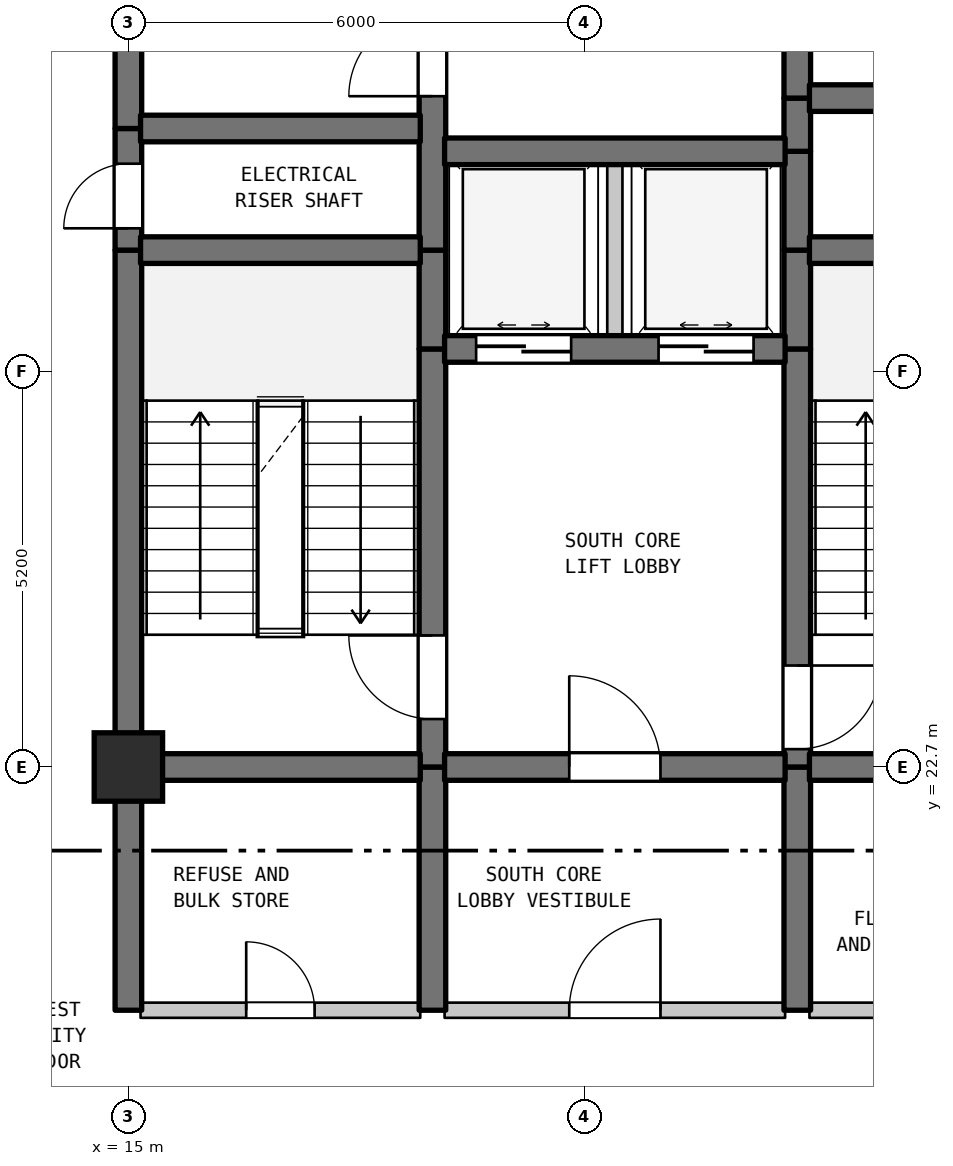
"""IFC4 building model, lengths in metres.
Left out: names, types, materials, properties, quantities, classifications, styles, units other than length and angle.
Written with IfcOpenShell. Run it as: python <this file> out.ifc"""

import sys

from ifc_helpers import new_model, si_unit, direction, frame, frame_2d, origin, origin_2d, place, context, subcontext, project, spatial, rectangle, extrude, element, fill, save


model = new_model("IFC4")
c1 = context("Model", 3, precision=1e-05, world=origin(), true_north=direction((0.0, 1.0)))
c2 = subcontext(c1, "Body", "Model", "MODEL_VIEW")
j1 = project(units=[si_unit("LENGTHUNIT", "METRE"), si_unit("PLANEANGLEUNIT", "RADIAN")], contexts=[c1])
p1 = place(None, origin())
s1 = spatial("IfcSite", under=j1, at=p1, CompositionType="ELEMENT")
p2 = place(p1, origin())
s2 = spatial("IfcBuilding", under=s1, at=p2, CompositionType="ELEMENT")
p3 = place(p2, frame((0.0, 0.0, 183.9)))
s3 = spatial("IfcBuildingStorey", under=s2, at=p3, CompositionType="ELEMENT", Elevation=183.9)
p4 = place(p3, frame((15.0, 22.7, 0.0), z_axis=(0.0, 0.0, 1.0), x_axis=(1.0, 0.0, 0.0)))
e1 = element("IfcColumn", 1, at=p4, inside=s3, PredefinedType="COLUMN", context=c2, shape_type="SweptSolid", body=[
    extrude(rectangle(XDim=0.9, YDim=0.9, at=origin_2d()), origin(), (0.0, 0.0, 1.0), 4.5),
])
p5 = place(p3, frame((15.0, 19.5, 0.0), z_axis=(0.0, 0.0, 1.0), x_axis=(0.0, 1.0, 0.0)))
e2 = element("IfcWall", 2, at=p5, inside=s3, PredefinedType="SHEAR", context=c2, shape_type="SweptSolid", body=[
    extrude(rectangle(XDim=3.2, YDim=0.35, at=frame_2d((1.6, 0.0))), origin(), (0.0, 0.0, 1.0), 4.19),
])
p6 = place(p3, frame((15.0, 22.7, 0.0), z_axis=(0.0, 0.0, 1.0), x_axis=(0.0, 1.0, 0.0)))
e3 = element("IfcWall", 3, at=p6, inside=s3, PredefinedType="SHEAR", context=c2, shape_type="SweptSolid", body=[
    extrude(rectangle(XDim=6.8, YDim=0.35, at=frame_2d((3.4, 0.0))), origin(), (0.0, 0.0, 1.0), 4.19),
])
p7 = place(p3, frame((15.0, 29.5, 0.0), z_axis=(0.0, 0.0, 1.0), x_axis=(0.0, 1.0, 0.0)))
e4 = element("IfcWall", 4, at=p7, inside=s3, PredefinedType="SHEAR", context=c2, shape_type="SweptSolid", body=[
    extrude(rectangle(XDim=1.6, YDim=0.35, at=frame_2d((0.8, 0.0))), origin(), (0.0, 0.0, 1.0), 4.19),
])
p8 = place(p7, frame((0.287, 0.0, 0.0)))
e5 = element("IfcOpeningElement", 5, at=p8, cuts=e4, PredefinedType="OPENING", context=c2, shape_type="SweptSolid", body=[
    extrude(rectangle(XDim=0.85, YDim=2.1, at=frame_2d((0.425, 1.05))), frame((0.0, 0.185, 0.0), z_axis=(0.0, -1.0, 0.0), x_axis=(1.0, 0.0, 0.0)), (0.0, 0.0, 1.0), 0.37),
])
p9 = place(p3, frame((15.0, 31.1, 0.0), z_axis=(0.0, 0.0, 1.0), x_axis=(0.0, 1.0, 0.0)))
e6 = element("IfcWall", 6, at=p9, inside=s3, PredefinedType="SHEAR", context=c2, shape_type="SweptSolid", body=[
    extrude(rectangle(XDim=6.87, YDim=0.35, at=frame_2d((3.435, 0.0))), origin(), (0.0, 0.0, 1.0), 4.19),
])
p10 = place(p3, frame((19.0, 19.5, 0.0), z_axis=(0.0, 0.0, 1.0), x_axis=(0.0, 1.0, 0.0)))
e7 = element("IfcWall", 7, at=p10, inside=s3, PredefinedType="SHEAR", context=c2, shape_type="SweptSolid", body=[
    extrude(rectangle(XDim=3.2, YDim=0.35, at=frame_2d((1.6, 0.0))), origin(), (0.0, 0.0, 1.0), 4.19),
])
p11 = place(p3, frame((19.0, 22.7, 0.0), z_axis=(0.0, 0.0, 1.0), x_axis=(0.0, 1.0, 0.0)))
e8 = element("IfcWall", 8, at=p11, inside=s3, PredefinedType="SHEAR", context=c2, shape_type="SweptSolid", body=[
    extrude(rectangle(XDim=5.5, YDim=0.35, at=frame_2d((2.75, 0.0))), origin(), (0.0, 0.0, 1.0), 4.19),
])
p12 = place(p11, frame((0.631, 0.0, 0.0)))
e9 = element("IfcOpeningElement", 9, at=p12, cuts=e8, PredefinedType="OPENING", context=c2, shape_type="SweptSolid", body=[
    extrude(rectangle(XDim=1.1, YDim=2.15, at=frame_2d((0.55, 1.075))), frame((0.0, 0.185, 0.0), z_axis=(0.0, -1.0, 0.0), x_axis=(1.0, 0.0, 0.0)), (0.0, 0.0, 1.0), 0.37),
])
p13 = place(p3, frame((19.0, 28.2, 0.0), z_axis=(0.0, 0.0, 1.0), x_axis=(0.0, 1.0, 0.0)))
e10 = element("IfcWall", 10, at=p13, inside=s3, PredefinedType="SHEAR", context=c2, shape_type="SweptSolid", body=[
    extrude(rectangle(XDim=1.3, YDim=0.35, at=frame_2d((0.65, 0.0))), origin(), (0.0, 0.0, 1.0), 4.19),
])
p14 = place(p3, frame((19.0, 29.5, 0.0), z_axis=(0.0, 0.0, 1.0), x_axis=(0.0, 1.0, 0.0)))
e11 = element("IfcWall", 11, at=p14, inside=s3, PredefinedType="SHEAR", context=c2, shape_type="SweptSolid", body=[
    extrude(rectangle(XDim=5.5, YDim=0.35, at=frame_2d((2.75, 0.0))), origin(), (0.0, 0.0, 1.0), 4.19),
])
p15 = place(p14, frame((2.025, 0.0, 0.0)))
e12 = element("IfcOpeningElement", 12, at=p15, cuts=e11, PredefinedType="OPENING", context=c2, shape_type="SweptSolid", body=[
    extrude(rectangle(XDim=1.1, YDim=2.15, at=frame_2d((0.55, 1.075))), frame((0.0, 0.185, 0.0), z_axis=(0.0, -1.0, 0.0), x_axis=(1.0, 0.0, 0.0)), (0.0, 0.0, 1.0), 0.37),
])
p16 = place(p3, frame((21.4, 28.2, 0.0), z_axis=(0.0, 0.0, 1.0), x_axis=(0.0, 1.0, 0.0)))
e13 = element("IfcWall", 13, at=p16, inside=s3, PredefinedType="STANDARD", context=c2, shape_type="SweptSolid", body=[
    extrude(rectangle(XDim=2.6, YDim=0.2, at=frame_2d((1.3, 0.0))), origin(), (0.0, 0.0, 1.0), 4.19),
])
p17 = place(p3, frame((23.8, 19.5, 0.0), z_axis=(0.0, 0.0, 1.0), x_axis=(0.0, 1.0, 0.0)))
e14 = element("IfcWall", 14, at=p17, inside=s3, PredefinedType="SHEAR", context=c2, shape_type="SweptSolid", body=[
    extrude(rectangle(XDim=3.2, YDim=0.35, at=frame_2d((1.6, 0.0))), origin(), (0.0, 0.0, 1.0), 4.19),
])
p18 = place(p3, frame((23.8, 22.7, 0.0), z_axis=(0.0, 0.0, 1.0), x_axis=(0.0, 1.0, 0.0)))
e15 = element("IfcWall", 15, at=p18, inside=s3, PredefinedType="SHEAR", context=c2, shape_type="SweptSolid", body=[
    extrude(rectangle(XDim=5.5, YDim=0.35, at=frame_2d((2.75, 0.0))), origin(), (0.0, 0.0, 1.0), 4.19),
])
p19 = place(p18, frame((0.235, 0.0, 0.0)))
e16 = element("IfcOpeningElement", 16, at=p19, cuts=e15, PredefinedType="OPENING", context=c2, shape_type="SweptSolid", body=[
    extrude(rectangle(XDim=1.1, YDim=2.15, at=frame_2d((0.55, 1.075))), frame((0.0, 0.185, 0.0), z_axis=(0.0, -1.0, 0.0), x_axis=(1.0, 0.0, 0.0)), (0.0, 0.0, 1.0), 0.37),
])
for number, where, z_axis, x_axis in (
    (17, (23.8, 28.2, 0.0), (0.0, 0.0, 1.0), (0.0, 1.0, 0.0)),
    (18, (23.8, 29.5, 0.0), (0.0, 0.0, 1.0), (0.0, 1.0, 0.0)),
):
    element("IfcWall", number, at=place(p3, frame(where, z_axis=z_axis, x_axis=x_axis)), inside=s3, PredefinedType="SHEAR", context=c2, shape_type="SweptSolid", body=[
        extrude(rectangle(XDim=1.3, YDim=0.35, at=frame_2d((0.65, 0.0))), origin(), (0.0, 0.0, 1.0), 4.19),
    ])
p20 = place(p3, frame((23.8, 30.8, 0.0), z_axis=(0.0, 0.0, 1.0), x_axis=(0.0, 1.0, 0.0)))
e19 = element("IfcWall", 19, at=p20, inside=s3, PredefinedType="SHEAR", context=c2, shape_type="SweptSolid", body=[
    extrude(rectangle(XDim=0.7, YDim=0.35, at=frame_2d((0.35, 0.0))), origin(), (0.0, 0.0, 1.0), 4.19),
])
p21 = place(p3, frame((23.8, 31.5, 0.0), z_axis=(0.0, 0.0, 1.0), x_axis=(0.0, 1.0, 0.0)))
e20 = element("IfcWall", 20, at=p21, inside=s3, PredefinedType="SHEAR", context=c2, shape_type="SweptSolid", body=[
    extrude(rectangle(XDim=3.5, YDim=0.35, at=frame_2d((1.75, 0.0))), origin(), (0.0, 0.0, 1.0), 4.19),
])
p22 = place(p21, frame((1.127, 0.0, 0.0)))
e21 = element("IfcOpeningElement", 21, at=p22, cuts=e20, PredefinedType="OPENING", context=c2, shape_type="SweptSolid", body=[
    extrude(rectangle(XDim=1.1, YDim=2.15, at=frame_2d((0.55, 1.075))), frame((0.0, 0.185, 0.0), z_axis=(0.0, -1.0, 0.0), x_axis=(1.0, 0.0, 0.0)), (0.0, 0.0, 1.0), 0.37),
])
p23 = place(p3, frame((15.16, 19.5, 0.0), z_axis=(0.0, 0.0, 1.0), x_axis=(1.0, 0.0, 0.0)))
e22 = element("IfcWall", 22, at=p23, inside=s3, PredefinedType="STANDARD", context=c2, shape_type="SweptSolid", body=[
    extrude(rectangle(XDim=3.68, YDim=0.2, at=frame_2d((1.84, 0.0))), origin(), (0.0, 0.0, 1.0), 4.19),
])
p24 = place(p23, frame((1.39, 0.0, 0.0)))
e23 = element("IfcOpeningElement", 23, at=p24, cuts=e22, PredefinedType="OPENING", context=c2, shape_type="SweptSolid", body=[
    extrude(rectangle(XDim=0.9, YDim=2.15, at=frame_2d((0.45, 1.075))), frame((0.0, 0.11, 0.0), z_axis=(0.0, -1.0, 0.0), x_axis=(1.0, 0.0, 0.0)), (0.0, 0.0, 1.0), 0.22),
])
p25 = place(p3, frame((19.16, 19.5, 0.0), z_axis=(0.0, 0.0, 1.0), x_axis=(1.0, 0.0, 0.0)))
e24 = element("IfcWall", 24, at=p25, inside=s3, PredefinedType="STANDARD", context=c2, shape_type="SweptSolid", body=[
    extrude(rectangle(XDim=4.48, YDim=0.2, at=frame_2d((2.24, 0.0))), origin(), (0.0, 0.0, 1.0), 4.19),
])
p26 = place(p25, frame((1.64, 0.0, 0.0)))
e25 = element("IfcOpeningElement", 25, at=p26, cuts=e24, PredefinedType="OPENING", context=c2, shape_type="SweptSolid", body=[
    extrude(rectangle(XDim=1.2, YDim=2.2, at=frame_2d((0.6, 1.1))), frame((0.0, 0.11, 0.0), z_axis=(0.0, -1.0, 0.0), x_axis=(1.0, 0.0, 0.0)), (0.0, 0.0, 1.0), 0.22),
])
p27 = place(p3, frame((23.96, 19.5, 0.0), z_axis=(0.0, 0.0, 1.0), x_axis=(1.0, 0.0, 0.0)))
e26 = element("IfcWall", 26, at=p27, inside=s3, PredefinedType="STANDARD", context=c2, shape_type="SweptSolid", body=[
    extrude(rectangle(XDim=3.155, YDim=0.2, at=frame_2d((1.578, 0.0))), origin(), (0.0, 0.0, 1.0), 4.19),
])
p28 = place(p27, frame((0.991, 0.0, 0.0)))
e27 = element("IfcOpeningElement", 27, at=p28, cuts=e26, PredefinedType="OPENING", context=c2, shape_type="SweptSolid", body=[
    extrude(rectangle(XDim=0.95, YDim=2.15, at=frame_2d((0.475, 1.075))), frame((0.0, 0.11, 0.0), z_axis=(0.0, -1.0, 0.0), x_axis=(1.0, 0.0, 0.0)), (0.0, 0.0, 1.0), 0.22),
])
p29 = place(p3, frame((15.16, 22.7, 0.0), z_axis=(0.0, 0.0, 1.0), x_axis=(1.0, 0.0, 0.0)))
e28 = element("IfcWall", 28, at=p29, inside=s3, PredefinedType="SHEAR", context=c2, shape_type="SweptSolid", body=[
    extrude(rectangle(XDim=3.68, YDim=0.35, at=frame_2d((1.84, 0.0))), origin(), (0.0, 0.0, 1.0), 4.19),
])
p30 = place(p3, frame((19.16, 22.7, 0.0), z_axis=(0.0, 0.0, 1.0), x_axis=(1.0, 0.0, 0.0)))
e29 = element("IfcWall", 29, at=p30, inside=s3, PredefinedType="SHEAR", context=c2, shape_type="SweptSolid", body=[
    extrude(rectangle(XDim=4.48, YDim=0.35, at=frame_2d((2.24, 0.0))), origin(), (0.0, 0.0, 1.0), 4.19),
])
p31 = place(p30, frame((1.64, 0.0, 0.0)))
e30 = element("IfcOpeningElement", 30, at=p31, cuts=e29, PredefinedType="OPENING", context=c2, shape_type="SweptSolid", body=[
    extrude(rectangle(XDim=1.2, YDim=2.2, at=frame_2d((0.6, 1.1))), frame((0.0, 0.185, 0.0), z_axis=(0.0, -1.0, 0.0), x_axis=(1.0, 0.0, 0.0)), (0.0, 0.0, 1.0), 0.37),
])
p32 = place(p3, frame((23.96, 22.7, 0.0), z_axis=(0.0, 0.0, 1.0), x_axis=(1.0, 0.0, 0.0)))
e31 = element("IfcWall", 31, at=p32, inside=s3, PredefinedType="SHEAR", context=c2, shape_type="SweptSolid", body=[
    extrude(rectangle(XDim=3.155, YDim=0.35, at=frame_2d((1.578, 0.0))), origin(), (0.0, 0.0, 1.0), 4.19),
])
p33 = place(p3, frame((19.16, 28.2, 0.0), z_axis=(0.0, 0.0, 1.0), x_axis=(1.0, 0.0, 0.0)))
e32 = element("IfcWall", 32, at=p33, inside=s3, PredefinedType="SHEAR", context=c2, shape_type="SweptSolid", body=[
    extrude(rectangle(XDim=4.48, YDim=0.35, at=frame_2d((2.24, 0.0))), origin(), (0.0, 0.0, 1.0), 4.19),
])
p34 = place(p33, frame((0.415, 0.0, 0.0)))
e33 = element("IfcOpeningElement", 33, at=p34, cuts=e32, PredefinedType="OPENING", context=c2, shape_type="SweptSolid", body=[
    extrude(rectangle(XDim=1.25, YDim=2.2, at=frame_2d((0.625, 1.1))), frame((0.0, 0.185, 0.0), z_axis=(0.0, -1.0, 0.0), x_axis=(1.0, 0.0, 0.0)), (0.0, 0.0, 1.0), 0.37),
])
p35 = place(p33, frame((2.815, 0.0, 0.0)))
e34 = element("IfcOpeningElement", 34, at=p35, cuts=e32, PredefinedType="OPENING", context=c2, shape_type="SweptSolid", body=[
    extrude(rectangle(XDim=1.25, YDim=2.2, at=frame_2d((0.625, 1.1))), frame((0.0, 0.185, 0.0), z_axis=(0.0, -1.0, 0.0), x_axis=(1.0, 0.0, 0.0)), (0.0, 0.0, 1.0), 0.37),
])
p36 = place(p3, frame((15.16, 29.5, 0.0), z_axis=(0.0, 0.0, 1.0), x_axis=(1.0, 0.0, 0.0)))
e35 = element("IfcWall", 35, at=p36, inside=s3, PredefinedType="SHEAR", context=c2, shape_type="SweptSolid", body=[
    extrude(rectangle(XDim=3.68, YDim=0.35, at=frame_2d((1.84, 0.0))), origin(), (0.0, 0.0, 1.0), 4.19),
])
p37 = place(p3, frame((23.96, 29.5, 0.0), z_axis=(0.0, 0.0, 1.0), x_axis=(1.0, 0.0, 0.0)))
e36 = element("IfcWall", 36, at=p37, inside=s3, PredefinedType="SHEAR", context=c2, shape_type="SweptSolid", body=[
    extrude(rectangle(XDim=3.18, YDim=0.35, at=frame_2d((1.59, 0.0))), origin(), (0.0, 0.0, 1.0), 4.19),
])
p38 = place(p3, frame((19.16, 30.8, 0.0), z_axis=(0.0, 0.0, 1.0), x_axis=(1.0, 0.0, 0.0)))
e37 = element("IfcWall", 37, at=p38, inside=s3, PredefinedType="SHEAR", context=c2, shape_type="SweptSolid", body=[
    extrude(rectangle(XDim=4.48, YDim=0.35, at=frame_2d((2.24, 0.0))), origin(), (0.0, 0.0, 1.0), 4.19),
])
p39 = place(p3, frame((15.16, 31.1, 0.0), z_axis=(0.0, 0.0, 1.0), x_axis=(1.0, 0.0, 0.0)))
e38 = element("IfcWall", 38, at=p39, inside=s3, PredefinedType="SHEAR", context=c2, shape_type="SweptSolid", body=[
    extrude(rectangle(XDim=3.68, YDim=0.35, at=frame_2d((1.84, 0.0))), origin(), (0.0, 0.0, 1.0), 4.19),
])
p40 = place(p3, frame((23.96, 31.5, 0.0), z_axis=(0.0, 0.0, 1.0), x_axis=(1.0, 0.0, 0.0)))
e39 = element("IfcWall", 39, at=p40, inside=s3, PredefinedType="SHEAR", context=c2, shape_type="SweptSolid", body=[
    extrude(rectangle(XDim=3.18, YDim=0.35, at=frame_2d((1.59, 0.0))), origin(), (0.0, 0.0, 1.0), 4.19),
])
p41 = place(p40, frame((1.094, 0.0, 0.0)))
e40 = element("IfcOpeningElement", 40, at=p41, cuts=e39, PredefinedType="OPENING", context=c2, shape_type="SweptSolid", body=[
    extrude(rectangle(XDim=0.85, YDim=2.1, at=frame_2d((0.425, 1.05))), frame((0.0, 0.185, 0.0), z_axis=(0.0, -1.0, 0.0), x_axis=(1.0, 0.0, 0.0)), (0.0, 0.0, 1.0), 0.37),
])
p42 = place(p8, origin())
e41 = element("IfcDoor", 41, at=p42, inside=s3, OperationType="SINGLE_SWING_LEFT", PredefinedType="DOOR", context=c2, shape_type="SweptSolid", body=[
    extrude(rectangle(XDim=0.85, YDim=2.1, at=frame_2d((0.425, 1.05))), frame((0.0, 0.025, 0.0), z_axis=(0.0, -1.0, 0.0), x_axis=(1.0, 0.0, 0.0)), (0.0, 0.0, 1.0), 0.05),
])
fill(e5, e41)
p43 = place(p12, origin())
e42 = element("IfcDoor", 42, at=p43, inside=s3, OperationType="SINGLE_SWING_RIGHT", PredefinedType="DOOR", context=c2, shape_type="SweptSolid", body=[
    extrude(rectangle(XDim=1.1, YDim=2.15, at=frame_2d((0.55, 1.075))), frame((0.0, 0.025, 0.0), z_axis=(0.0, -1.0, 0.0), x_axis=(1.0, 0.0, 0.0)), (0.0, 0.0, 1.0), 0.05),
])
fill(e9, e42)
p44 = place(p15, origin())
e43 = element("IfcDoor", 43, at=p44, inside=s3, OperationType="SINGLE_SWING_LEFT", PredefinedType="DOOR", context=c2, shape_type="SweptSolid", body=[
    extrude(rectangle(XDim=1.1, YDim=2.15, at=frame_2d((0.55, 1.075))), frame((0.0, 0.025, 0.0), z_axis=(0.0, -1.0, 0.0), x_axis=(1.0, 0.0, 0.0)), (0.0, 0.0, 1.0), 0.05),
])
fill(e12, e43)
p45 = place(p19, frame((1.1, 0.0, 0.0), z_axis=(0.0, 0.0, 1.0), x_axis=(-1.0, 0.0, 0.0)))
e44 = element("IfcDoor", 44, at=p45, inside=s3, OperationType="SINGLE_SWING_RIGHT", PredefinedType="DOOR", context=c2, shape_type="SweptSolid", body=[
    extrude(rectangle(XDim=1.1, YDim=2.15, at=frame_2d((0.55, 1.075))), frame((0.0, 0.025, 0.0), z_axis=(0.0, -1.0, 0.0), x_axis=(1.0, 0.0, 0.0)), (0.0, 0.0, 1.0), 0.05),
])
fill(e16, e44)
p46 = place(p24, origin())
e45 = element("IfcDoor", 45, at=p46, inside=s3, OperationType="SINGLE_SWING_LEFT", PredefinedType="DOOR", context=c2, shape_type="SweptSolid", body=[
    extrude(rectangle(XDim=0.9, YDim=2.15, at=frame_2d((0.45, 1.075))), frame((0.0, 0.025, 0.0), z_axis=(0.0, -1.0, 0.0), x_axis=(1.0, 0.0, 0.0)), (0.0, 0.0, 1.0), 0.05),
])
fill(e23, e45)
p47 = place(p26, origin())
e46 = element("IfcDoor", 46, at=p47, inside=s3, OperationType="SINGLE_SWING_RIGHT", PredefinedType="DOOR", context=c2, shape_type="SweptSolid", body=[
    extrude(rectangle(XDim=1.2, YDim=2.2, at=frame_2d((0.6, 1.1))), frame((0.0, 0.025, 0.0), z_axis=(0.0, -1.0, 0.0), x_axis=(1.0, 0.0, 0.0)), (0.0, 0.0, 1.0), 0.05),
])
fill(e25, e46)
p48 = place(p31, origin())
e47 = element("IfcDoor", 47, at=p48, inside=s3, OperationType="SINGLE_SWING_LEFT", PredefinedType="DOOR", context=c2, shape_type="SweptSolid", body=[
    extrude(rectangle(XDim=1.2, YDim=2.2, at=frame_2d((0.6, 1.1))), frame((0.0, 0.025, 0.0), z_axis=(0.0, -1.0, 0.0), x_axis=(1.0, 0.0, 0.0)), (0.0, 0.0, 1.0), 0.05),
])
fill(e30, e47)
p49 = place(p34, origin())
e48 = element("IfcDoor", 48, at=p49, inside=s3, OperationType="DOUBLE_DOOR_SLIDING", PredefinedType="DOOR", context=c2, shape_type="SweptSolid", body=[
    extrude(rectangle(XDim=1.25, YDim=2.2, at=frame_2d((0.625, 1.1))), frame((0.0, 0.025, 0.0), z_axis=(0.0, -1.0, 0.0), x_axis=(1.0, 0.0, 0.0)), (0.0, 0.0, 1.0), 0.05),
])
fill(e33, e48)
p50 = place(p35, origin())
e49 = element("IfcDoor", 49, at=p50, inside=s3, OperationType="DOUBLE_DOOR_SLIDING", PredefinedType="DOOR", context=c2, shape_type="SweptSolid", body=[
    extrude(rectangle(XDim=1.25, YDim=2.2, at=frame_2d((0.625, 1.1))), frame((0.0, 0.025, 0.0), z_axis=(0.0, -1.0, 0.0), x_axis=(1.0, 0.0, 0.0)), (0.0, 0.0, 1.0), 0.05),
])
fill(e34, e49)
save(model, sys.argv[1])
